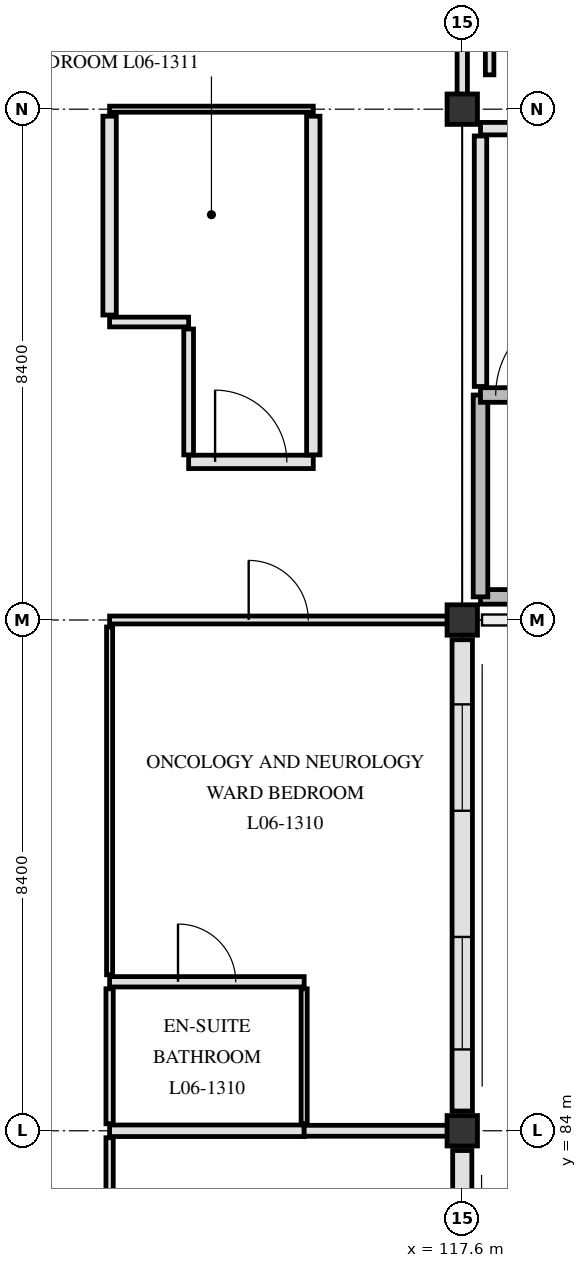
"""IFC4 building model, lengths in metres.
Left out: names, types, materials, properties, quantities, classifications, styles, units other than length and angle.
Written with IfcOpenShell. Run it as: python <this file> out.ifc"""

import sys

from ifc_helpers import new_model, si_unit, direction, frame, frame_2d, origin, origin_2d, place, context, subcontext, project, spatial, rectangle, extrude, element, fill, save


model = new_model("IFC4")
c1 = context("Model", 3, precision=1e-05, world=origin(), true_north=direction((0.0, 1.0)))
c2 = subcontext(c1, "Body", "Model", "MODEL_VIEW")
j1 = project(units=[si_unit("LENGTHUNIT", "METRE"), si_unit("PLANEANGLEUNIT", "RADIAN")], contexts=[c1])
p1 = place(None, origin())
s1 = spatial("IfcSite", under=j1, at=p1, CompositionType="ELEMENT")
p2 = place(p1, origin())
s2 = spatial("IfcBuilding", under=s1, at=p2, CompositionType="ELEMENT")
p3 = place(p2, frame((0.0, 0.0, 26.4)))
s3 = spatial("IfcBuildingStorey", under=s2, at=p3, CompositionType="ELEMENT", Elevation=26.4)
for number, where, z_axis, x_axis in (
    (1, (117.6, 84.0, 0.0), (0.0, 0.0, 1.0), (1.0, 0.0, 0.0)),
    (2, (117.6, 92.4, 0.0), (0.0, 0.0, 1.0), (1.0, 0.0, 0.0)),
    (3, (117.6, 100.8, 0.0), (0.0, 0.0, 1.0), (1.0, 0.0, 0.0)),
):
    element("IfcColumn", number, at=place(p3, frame(where, z_axis=z_axis, x_axis=x_axis)), inside=s3, PredefinedType="COLUMN", context=c2, shape_type="SweptSolid", body=[
        extrude(rectangle(XDim=0.5, YDim=0.5, at=origin_2d()), origin(), (0.0, 0.0, 1.0), 3.9),
    ])
p4 = place(p3, frame((117.6, 92.075, 0.0), z_axis=(0.0, 0.0, 1.0), x_axis=(0.0, -1.0, 0.0)))
e4 = element("IfcWall", 4, at=p4, inside=s3, PredefinedType="SOLIDWALL", context=c2, shape_type="SweptSolid", body=[
    extrude(rectangle(XDim=7.75, YDim=0.335, at=frame_2d((3.875, 0.0))), origin(), (0.0, 0.0, 1.0), 3.34),
])
p5 = place(p4, frame((1.062, 0.0, 0.85)))
e5 = element("IfcOpeningElement", 5, at=p5, cuts=e4, PredefinedType="OPENING", context=c2, shape_type="SweptSolid", body=[
    extrude(rectangle(XDim=1.75, YDim=1.3, at=frame_2d((0.875, 0.65))), frame((0.0, 0.177, 0.0), z_axis=(0.0, -1.0, 0.0), x_axis=(1.0, 0.0, 0.0)), (0.0, 0.0, 1.0), 0.355),
])
p6 = place(p4, frame((4.887, 0.0, 0.85)))
e6 = element("IfcOpeningElement", 6, at=p6, cuts=e4, PredefinedType="OPENING", context=c2, shape_type="SweptSolid", body=[
    extrude(rectangle(XDim=1.85, YDim=1.3, at=frame_2d((0.925, 0.65))), frame((0.0, 0.177, 0.0), z_axis=(0.0, -1.0, 0.0), x_axis=(1.0, 0.0, 0.0)), (0.0, 0.0, 1.0), 0.355),
])
p7 = place(p3, frame((117.6, 83.675, 0.0), z_axis=(0.0, 0.0, 1.0), x_axis=(0.0, -1.0, 0.0)))
e7 = element("IfcWall", 7, at=p7, inside=s3, PredefinedType="SOLIDWALL", context=c2, shape_type="SweptSolid", body=[
    extrude(rectangle(XDim=7.75, YDim=0.315, at=frame_2d((3.875, 0.0))), origin(), (0.0, 0.0, 1.0), 3.34),
])
p8 = place(p7, frame((1.438, 0.0, 0.85)))
e8 = element("IfcOpeningElement", 8, at=p8, cuts=e7, PredefinedType="OPENING", context=c2, shape_type="SweptSolid", body=[
    extrude(rectangle(XDim=1.0, YDim=1.42, at=frame_2d((0.5, 0.71))), frame((0.0, 0.167, 0.0), z_axis=(0.0, -1.0, 0.0), x_axis=(1.0, 0.0, 0.0)), (0.0, 0.0, 1.0), 0.335),
])
p9 = place(p7, frame((5.262, 0.0, 0.85)))
e9 = element("IfcOpeningElement", 9, at=p9, cuts=e7, PredefinedType="OPENING", context=c2, shape_type="SweptSolid", body=[
    extrude(rectangle(XDim=1.1, YDim=1.42, at=frame_2d((0.55, 0.71))), frame((0.0, 0.167, 0.0), z_axis=(0.0, -1.0, 0.0), x_axis=(1.0, 0.0, 0.0)), (0.0, 0.0, 1.0), 0.335),
])
p10 = place(p3, frame((117.9, 92.78, 0.0), z_axis=(0.0, 0.0, 1.0), x_axis=(1.0, 0.0, 0.0)))
e10 = element("IfcWall", 10, at=p10, inside=s3, PredefinedType="SHEAR", context=c2, shape_type="SweptSolid", body=[
    extrude(rectangle(XDim=7.82, YDim=0.24, at=frame_2d((3.91, 0.0))), origin(), (0.0, 0.0, 1.0), 3.62),
])
p11 = place(p3, frame((117.9, 92.78, 0.0), z_axis=(0.0, 0.0, 1.0), x_axis=(0.0, 1.0, 0.0)))
e11 = element("IfcWall", 11, at=p11, inside=s3, PredefinedType="SHEAR", context=c2, shape_type="SweptSolid", body=[
    extrude(rectangle(XDim=3.32, YDim=0.24, at=frame_2d((1.66, 0.0))), origin(), (0.0, 0.0, 1.0), 3.62),
])
p12 = place(p3, frame((117.9, 96.1, 0.0), z_axis=(0.0, 0.0, 1.0), x_axis=(1.0, 0.0, 0.0)))
e12 = element("IfcWall", 12, at=p12, inside=s3, PredefinedType="SHEAR", context=c2, shape_type="SweptSolid", body=[
    extrude(rectangle(XDim=7.82, YDim=0.24, at=frame_2d((3.91, 0.0))), origin(), (0.0, 0.0, 1.0), 3.62),
])
p13 = place(p12, frame((0.25, 0.0, 0.0)))
e13 = element("IfcOpeningElement", 13, at=p13, cuts=e12, PredefinedType="OPENING", context=c2, shape_type="SweptSolid", body=[
    extrude(rectangle(XDim=1.45, YDim=2.2, at=frame_2d((0.725, 1.1))), frame((0.0, 0.13, 0.0), z_axis=(0.0, -1.0, 0.0), x_axis=(1.0, 0.0, 0.0)), (0.0, 0.0, 1.0), 0.26),
])
p14 = place(p3, frame((117.9, 96.24, 0.0), z_axis=(0.0, 0.0, 1.0), x_axis=(0.0, 1.0, 0.0)))
e14 = element("IfcWall", 14, at=p14, inside=s3, PredefinedType="PARTITIONING", context=c2, shape_type="SweptSolid", body=[
    extrude(rectangle(XDim=4.12, YDim=0.205, at=frame_2d((2.06, 0.0))), origin(), (0.0, 0.0, 1.0), 3.61),
])
p15 = place(p3, frame((117.9, 100.48, 0.0), z_axis=(0.0, 0.0, 1.0), x_axis=(1.0, 0.0, 0.0)))
e15 = element("IfcWall", 15, at=p15, inside=s3, PredefinedType="PARTITIONING", context=c2, shape_type="SweptSolid", body=[
    extrude(rectangle(XDim=4.18, YDim=0.205, at=frame_2d((2.09, 0.0))), origin(), (0.0, 0.0, 1.0), 3.61),
])
p16 = place(p15, frame((1.29, 0.0, 0.0)))
e16 = element("IfcOpeningElement", 16, at=p16, cuts=e15, PredefinedType="OPENING", context=c2, shape_type="SweptSolid", body=[
    extrude(rectangle(XDim=1.6, YDim=2.25, at=frame_2d((0.8, 1.125))), frame((0.0, 0.113, 0.0), z_axis=(0.0, -1.0, 0.0), x_axis=(1.0, 0.0, 0.0)), (0.0, 0.0, 1.0), 0.225),
])
p17 = place(p3, frame((111.8, 84.0, 0.0), z_axis=(0.0, 0.0, 1.0), x_axis=(1.0, 0.0, 0.0)))
e17 = element("IfcWall", 17, at=p17, inside=s3, PredefinedType="PARTITIONING", context=c2, shape_type="SweptSolid", body=[
    extrude(rectangle(XDim=3.2, YDim=0.19, at=frame_2d((1.6, 0.0))), origin(), (0.0, 0.0, 1.0), 3.21),
])
p18 = place(p3, frame((115.0, 84.0, 0.0), z_axis=(0.0, 0.0, 1.0), x_axis=(1.0, 0.0, 0.0)))
e18 = element("IfcWall", 18, at=p18, inside=s3, PredefinedType="PARTITIONING", context=c2, shape_type="SweptSolid", body=[
    extrude(rectangle(XDim=2.355, YDim=0.18, at=frame_2d((1.177, 0.0))), origin(), (0.0, 0.0, 1.0), 3.21),
])
p19 = place(p3, frame((111.8, 86.45, 0.0), z_axis=(0.0, 0.0, 1.0), x_axis=(1.0, 0.0, 0.0)))
e19 = element("IfcWall", 19, at=p19, inside=s3, PredefinedType="PARTITIONING", context=c2, shape_type="SweptSolid", body=[
    extrude(rectangle(XDim=3.2, YDim=0.17, at=frame_2d((1.6, 0.0))), origin(), (0.0, 0.0, 1.0), 3.61),
])
p20 = place(p19, frame((1.125, 0.0, 0.0)))
e20 = element("IfcOpeningElement", 20, at=p20, cuts=e19, PredefinedType="OPENING", context=c2, shape_type="SweptSolid", body=[
    extrude(rectangle(XDim=0.95, YDim=2.1, at=frame_2d((0.475, 1.05))), frame((0.0, 0.095, 0.0), z_axis=(0.0, -1.0, 0.0), x_axis=(1.0, 0.0, 0.0)), (0.0, 0.0, 1.0), 0.19),
])
p21 = place(p3, frame((111.8, 92.4, 0.0), z_axis=(0.0, 0.0, 1.0), x_axis=(1.0, 0.0, 0.0)))
e21 = element("IfcWall", 21, at=p21, inside=s3, PredefinedType="PARTITIONING", context=c2, shape_type="SweptSolid", body=[
    extrude(rectangle(XDim=5.555, YDim=0.13, at=frame_2d((2.777, 0.0))), origin(), (0.0, 0.0, 1.0), 3.21),
])
p22 = place(p21, frame((2.288, 0.0, 0.0)))
e22 = element("IfcOpeningElement", 22, at=p22, cuts=e21, PredefinedType="OPENING", context=c2, shape_type="SweptSolid", body=[
    extrude(rectangle(XDim=0.98, YDim=2.12, at=frame_2d((0.49, 1.06))), frame((0.0, 0.075, 0.0), z_axis=(0.0, -1.0, 0.0), x_axis=(1.0, 0.0, 0.0)), (0.0, 0.0, 1.0), 0.15),
])
p23 = place(p3, frame((113.1, 95.0, 0.0), z_axis=(0.0, 0.0, 1.0), x_axis=(1.0, 0.0, 0.0)))
e23 = element("IfcWall", 23, at=p23, inside=s3, PredefinedType="PARTITIONING", context=c2, shape_type="SweptSolid", body=[
    extrude(rectangle(XDim=2.05, YDim=0.22, at=frame_2d((1.025, 0.0))), origin(), (0.0, 0.0, 1.0), 3.34),
])
p24 = place(p23, frame((0.435, 0.0, 0.0)))
e24 = element("IfcOpeningElement", 24, at=p24, cuts=e23, PredefinedType="OPENING", context=c2, shape_type="SweptSolid", body=[
    extrude(rectangle(XDim=1.18, YDim=2.18, at=frame_2d((0.59, 1.09))), frame((0.0, 0.12, 0.0), z_axis=(0.0, -1.0, 0.0), x_axis=(1.0, 0.0, 0.0)), (0.0, 0.0, 1.0), 0.24),
])
p25 = place(p3, frame((111.8, 97.3, 0.0), z_axis=(0.0, 0.0, 1.0), x_axis=(1.0, 0.0, 0.0)))
e25 = element("IfcWall", 25, at=p25, inside=s3, PredefinedType="PARTITIONING", context=c2, shape_type="SweptSolid", body=[
    extrude(rectangle(XDim=1.3, YDim=0.16, at=frame_2d((0.65, 0.0))), origin(), (0.0, 0.0, 1.0), 3.61),
])
p26 = place(p3, frame((111.8, 100.8, 0.0), z_axis=(0.0, 0.0, 1.0), x_axis=(1.0, 0.0, 0.0)))
e26 = element("IfcWall", 26, at=p26, inside=s3, PredefinedType="PARTITIONING", context=c2, shape_type="SweptSolid", body=[
    extrude(rectangle(XDim=3.35, YDim=0.1, at=frame_2d((1.675, 0.0))), origin(), (0.0, 0.0, 1.0), 3.21),
])
p27 = place(p3, frame((111.8, 78.315, 0.0), z_axis=(0.0, 0.0, 1.0), x_axis=(0.0, 1.0, 0.0)))
e27 = element("IfcWall", 27, at=p27, inside=s3, PredefinedType="PARTITIONING", context=c2, shape_type="SweptSolid", body=[
    extrude(rectangle(XDim=5.57, YDim=0.12, at=frame_2d((2.785, 0.0))), origin(), (0.0, 0.0, 1.0), 3.34),
])
p28 = place(p3, frame((111.8, 84.115, 0.0), z_axis=(0.0, 0.0, 1.0), x_axis=(0.0, 1.0, 0.0)))
e28 = element("IfcWall", 28, at=p28, inside=s3, PredefinedType="PARTITIONING", context=c2, shape_type="SweptSolid", body=[
    extrude(rectangle(XDim=2.22, YDim=0.12, at=frame_2d((1.11, 0.0))), origin(), (0.0, 0.0, 1.0), 3.61),
])
p29 = place(p3, frame((111.8, 86.565, 0.0), z_axis=(0.0, 0.0, 1.0), x_axis=(0.0, 1.0, 0.0)))
e29 = element("IfcWall", 29, at=p29, inside=s3, PredefinedType="PARTITIONING", context=c2, shape_type="SweptSolid", body=[
    extrude(rectangle(XDim=5.72, YDim=0.1, at=frame_2d((2.86, 0.0))), origin(), (0.0, 0.0, 1.0), 3.34),
])
p30 = place(p3, frame((111.8, 97.415, 0.0), z_axis=(0.0, 0.0, 1.0), x_axis=(0.0, 1.0, 0.0)))
e30 = element("IfcWall", 30, at=p30, inside=s3, PredefinedType="PARTITIONING", context=c2, shape_type="SweptSolid", body=[
    extrude(rectangle(XDim=3.27, YDim=0.22, at=frame_2d((1.635, 0.0))), origin(), (0.0, 0.0, 1.0), 3.34),
])
p31 = place(p3, frame((113.1, 95.115, 0.0), z_axis=(0.0, 0.0, 1.0), x_axis=(0.0, 1.0, 0.0)))
e31 = element("IfcWall", 31, at=p31, inside=s3, PredefinedType="PARTITIONING", context=c2, shape_type="SweptSolid", body=[
    extrude(rectangle(XDim=2.07, YDim=0.16, at=frame_2d((1.035, 0.0))), origin(), (0.0, 0.0, 1.0), 3.34),
])
p32 = place(p3, frame((115.0, 84.115, 0.0), z_axis=(0.0, 0.0, 1.0), x_axis=(0.0, 1.0, 0.0)))
e32 = element("IfcWall", 32, at=p32, inside=s3, PredefinedType="PARTITIONING", context=c2, shape_type="SweptSolid", body=[
    extrude(rectangle(XDim=2.22, YDim=0.1, at=frame_2d((1.11, 0.0))), origin(), (0.0, 0.0, 1.0), 3.61),
])
p33 = place(p3, frame((115.15, 95.115, 0.0), z_axis=(0.0, 0.0, 1.0), x_axis=(0.0, 1.0, 0.0)))
e33 = element("IfcWall", 33, at=p33, inside=s3, PredefinedType="PARTITIONING", context=c2, shape_type="SweptSolid", body=[
    extrude(rectangle(XDim=5.57, YDim=0.22, at=frame_2d((2.785, 0.0))), origin(), (0.0, 0.0, 1.0), 3.34),
])
p34 = place(p3, frame((117.6, 101.045, 0.0), z_axis=(0.0, 0.0, 1.0), x_axis=(0.0, 1.0, 0.0)))
e34 = element("IfcWall", 34, at=p34, inside=s3, PredefinedType="PARTITIONING", context=c2, shape_type="SweptSolid", body=[
    extrude(rectangle(XDim=2.64, YDim=0.17, at=frame_2d((1.32, 0.0))), origin(), (0.0, 0.0, 1.0), 3.21),
])
p35 = place(p3, frame((118.05, 101.365, 0.0), z_axis=(0.0, 0.0, 1.0), x_axis=(0.0, 1.0, 0.0)))
e35 = element("IfcWall", 35, at=p35, inside=s3, PredefinedType="PARTITIONING", context=c2, shape_type="SweptSolid", body=[
    extrude(rectangle(XDim=1.885, YDim=0.14, at=frame_2d((0.942, 0.0))), origin(), (0.0, 0.0, 1.0), 3.61),
])
p36 = place(p5, origin())
e36 = element("IfcWindow", 36, at=p36, inside=s3, PartitioningType="SINGLE_PANEL", PredefinedType="WINDOW", context=c2, shape_type="SweptSolid", body=[
    extrude(rectangle(XDim=1.75, YDim=1.3, at=frame_2d((0.875, 0.65))), frame((0.0, 0.03, 0.0), z_axis=(0.0, -1.0, 0.0), x_axis=(1.0, 0.0, 0.0)), (0.0, 0.0, 1.0), 0.06),
])
fill(e5, e36)
p37 = place(p6, origin())
e37 = element("IfcWindow", 37, at=p37, inside=s3, PartitioningType="SINGLE_PANEL", PredefinedType="WINDOW", context=c2, shape_type="SweptSolid", body=[
    extrude(rectangle(XDim=1.85, YDim=1.3, at=frame_2d((0.925, 0.65))), frame((0.0, 0.03, 0.0), z_axis=(0.0, -1.0, 0.0), x_axis=(1.0, 0.0, 0.0)), (0.0, 0.0, 1.0), 0.06),
])
fill(e6, e37)
p38 = place(p13, origin())
e38 = element("IfcDoor", 38, at=p38, inside=s3, OperationType="SINGLE_SWING_RIGHT", PredefinedType="DOOR", context=c2, shape_type="SweptSolid", body=[
    extrude(rectangle(XDim=1.45, YDim=2.2, at=frame_2d((0.725, 1.1))), frame((0.0, 0.025, 0.0), z_axis=(0.0, -1.0, 0.0), x_axis=(1.0, 0.0, 0.0)), (0.0, 0.0, 1.0), 0.05),
])
fill(e13, e38)
p39 = place(p22, origin())
e39 = element("IfcDoor", 39, at=p39, inside=s3, OperationType="SINGLE_SWING_LEFT", PredefinedType="DOOR", context=c2, shape_type="SweptSolid", body=[
    extrude(rectangle(XDim=0.98, YDim=2.12, at=frame_2d((0.49, 1.06))), frame((0.0, 0.025, 0.0), z_axis=(0.0, -1.0, 0.0), x_axis=(1.0, 0.0, 0.0)), (0.0, 0.0, 1.0), 0.05),
])
fill(e22, e39)
p40 = place(p20, origin())
e40 = element("IfcDoor", 40, at=p40, inside=s3, OperationType="SINGLE_SWING_LEFT", PredefinedType="DOOR", context=c2, shape_type="SweptSolid", body=[
    extrude(rectangle(XDim=0.95, YDim=2.1, at=frame_2d((0.475, 1.05))), frame((0.0, 0.025, 0.0), z_axis=(0.0, -1.0, 0.0), x_axis=(1.0, 0.0, 0.0)), (0.0, 0.0, 1.0), 0.05),
])
fill(e20, e40)
p41 = place(p24, origin())
e41 = element("IfcDoor", 41, at=p41, inside=s3, OperationType="SINGLE_SWING_LEFT", PredefinedType="DOOR", context=c2, shape_type="SweptSolid", body=[
    extrude(rectangle(XDim=1.18, YDim=2.18, at=frame_2d((0.59, 1.09))), frame((0.0, 0.025, 0.0), z_axis=(0.0, -1.0, 0.0), x_axis=(1.0, 0.0, 0.0)), (0.0, 0.0, 1.0), 0.05),
])
fill(e24, e41)
save(model, sys.argv[1])
